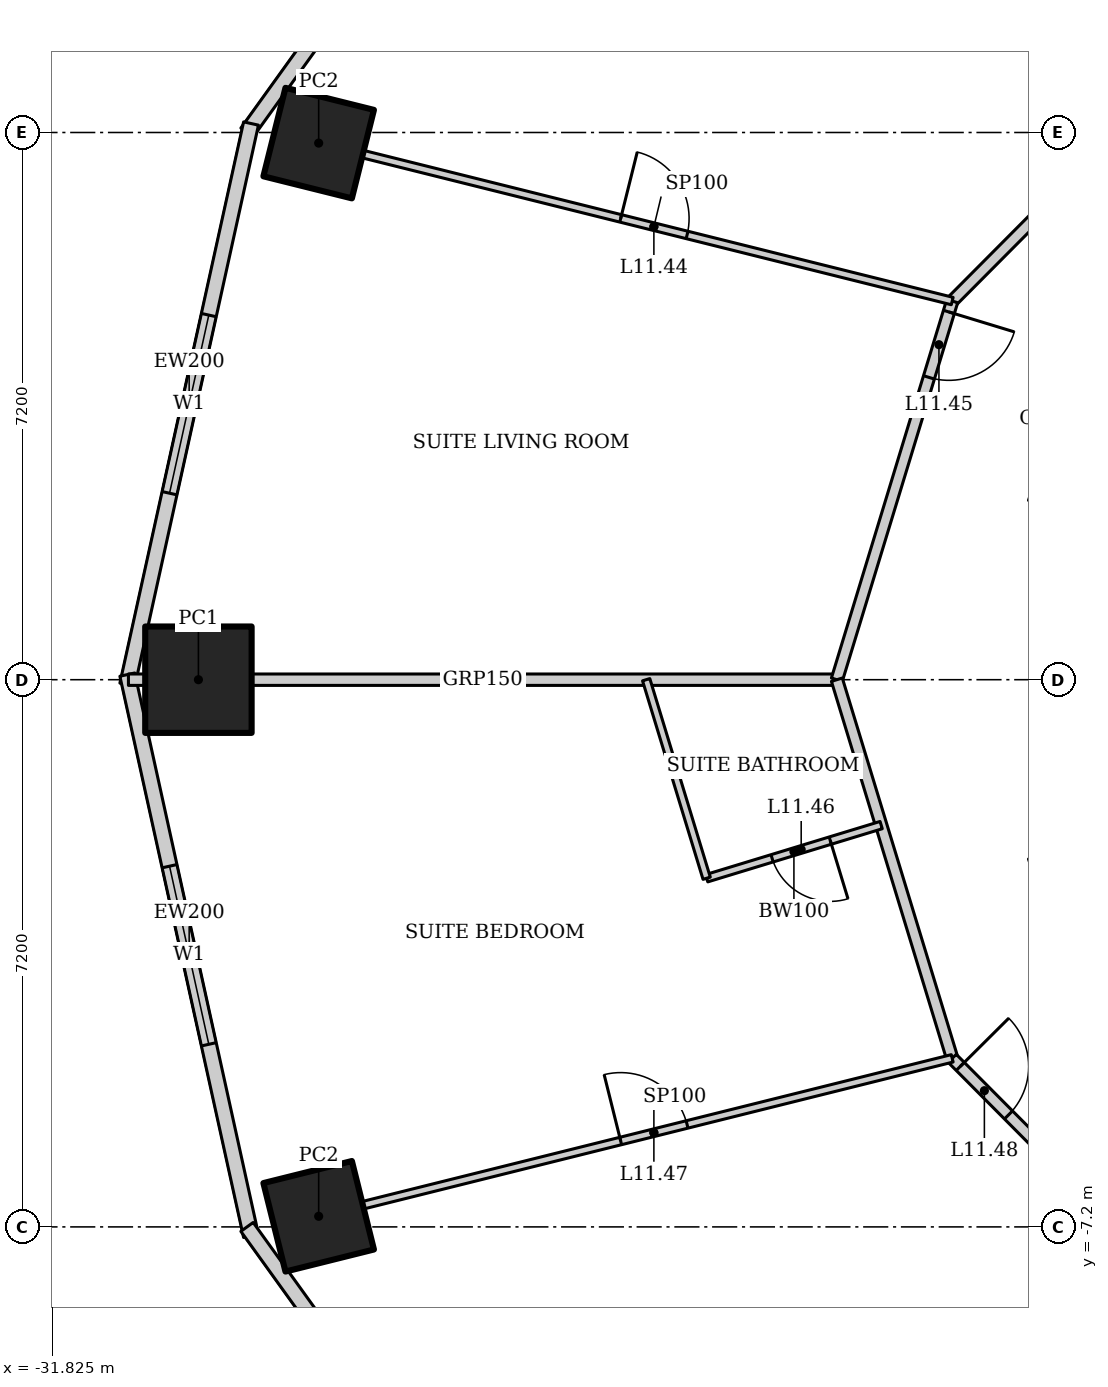
"""IFC4 building model, lengths in metres.
Left out: names, types, materials, properties, quantities, classifications, styles, units other than length and angle.
Written with IfcOpenShell. Run it as: python <this file> out.ifc"""

import sys

from ifc_helpers import new_model, si_unit, direction, frame, frame_2d, origin, origin_2d, place, context, subcontext, project, spatial, rectangle, hollow_rectangle, extrude, element, fill, save


model = new_model("IFC4")
c1 = context("Model", 3, precision=1e-05, world=origin(), true_north=direction((0.0, 1.0)))
c2 = subcontext(c1, "Body", "Model", "MODEL_VIEW")
j1 = project(units=[si_unit("LENGTHUNIT", "METRE"), si_unit("PLANEANGLEUNIT", "RADIAN")], contexts=[c1])
p1 = place(None, origin())
s1 = spatial("IfcSite", under=j1, at=p1, CompositionType="ELEMENT")
p2 = place(p1, origin())
s2 = spatial("IfcBuilding", under=s1, at=p2, CompositionType="ELEMENT")
p3 = place(p2, frame((0.0, 0.0, 55.0)))
s3 = spatial("IfcBuildingStorey", under=s2, at=p3, CompositionType="ELEMENT", Elevation=55.0)
p4 = place(p3, frame((-28.318, 7.06, 0.0), z_axis=(0.0, 0.0, 1.0), x_axis=(0.2419218956, 0.970295726276, 0.0)))
e1 = element("IfcColumn", 1, at=p4, inside=s3, PredefinedType="COLUMN", context=c2, shape_type="SweptSolid", body=[
    extrude(hollow_rectangle(XDim=1.2, YDim=1.2, WallThickness=0.1, at=origin_2d()), origin(), (0.0, 0.0, 1.0), 3.6),
])
p5 = place(p3, frame((-29.9, 0.0, 0.0), z_axis=(0.0, 0.0, 1.0), x_axis=(1.0, 0.0, 0.0)))
e2 = element("IfcColumn", 2, at=p5, inside=s3, PredefinedType="COLUMN", context=c2, shape_type="SweptSolid", body=[
    extrude(hollow_rectangle(XDim=1.4, YDim=1.4, WallThickness=0.1, at=origin_2d()), origin(), (0.0, 0.0, 1.0), 3.6),
])
p6 = place(p3, frame((-28.318, -7.06, 0.0), z_axis=(0.0, 0.0, 1.0), x_axis=(0.970295726276, 0.2419218956, 0.0)))
e3 = element("IfcColumn", 3, at=p6, inside=s3, PredefinedType="COLUMN", context=c2, shape_type="SweptSolid", body=[
    extrude(hollow_rectangle(XDim=1.2, YDim=1.2, WallThickness=0.1, at=origin_2d()), origin(), (0.0, 0.0, 1.0), 3.6),
])
p7 = place(p3, frame((-24.4, 13.957, 0.0), z_axis=(0.0, 0.0, 1.0), x_axis=(-0.583937613703, -0.811798536155, 0.0)))
e4 = element("IfcWall", 4, at=p7, inside=s3, PredefinedType="SOLIDWALL", context=c2, shape_type="SweptSolid", body=[
    extrude(rectangle(XDim=8.323, YDim=0.2, at=frame_2d((4.162, 0.0))), origin(), (0.0, 0.0, 1.0), 3.45),
])
p8 = place(p7, frame((2.961, 0.0, 0.5)))
e5 = element("IfcOpeningElement", 5, at=p8, cuts=e4, PredefinedType="OPENING", context=c2, shape_type="SweptSolid", body=[
    extrude(rectangle(XDim=2.4, YDim=2.2, at=frame_2d((1.2, 1.1))), frame((0.0, 0.11, 0.0), z_axis=(0.0, -1.0, 0.0), x_axis=(1.0, 0.0, 0.0)), (0.0, 0.0, 1.0), 0.22),
])
p9 = place(p3, frame((-29.208, 7.318, 0.0), z_axis=(0.0, 0.0, 1.0), x_axis=(-0.215238065514, -0.976561608478, 0.0)))
e6 = element("IfcWall", 6, at=p9, inside=s3, PredefinedType="SOLIDWALL", context=c2, shape_type="SweptSolid", body=[
    extrude(rectangle(XDim=7.562, YDim=0.2, at=frame_2d((3.781, 0.0))), origin(), (0.0, 0.0, 1.0), 3.45),
])
p10 = place(p9, frame((2.581, 0.0, 0.5)))
e7 = element("IfcOpeningElement", 7, at=p10, cuts=e6, PredefinedType="OPENING", context=c2, shape_type="SweptSolid", body=[
    extrude(rectangle(XDim=2.4, YDim=2.2, at=frame_2d((1.2, 1.1))), frame((0.0, 0.11, 0.0), z_axis=(0.0, -1.0, 0.0), x_axis=(1.0, 0.0, 0.0)), (0.0, 0.0, 1.0), 0.22),
])
p11 = place(p3, frame((-30.835, 0.067, 0.0), z_axis=(0.0, 0.0, 1.0), x_axis=(0.215238065514, -0.976561608478, 0.0)))
e8 = element("IfcWall", 8, at=p11, inside=s3, PredefinedType="SOLIDWALL", context=c2, shape_type="SweptSolid", body=[
    extrude(rectangle(XDim=7.562, YDim=0.2, at=frame_2d((3.781, 0.0))), origin(), (0.0, 0.0, 1.0), 3.45),
])
p12 = place(p11, frame((2.581, 0.0, 0.5)))
e9 = element("IfcOpeningElement", 9, at=p12, cuts=e8, PredefinedType="OPENING", context=c2, shape_type="SweptSolid", body=[
    extrude(rectangle(XDim=2.4, YDim=2.2, at=frame_2d((1.2, 1.1))), frame((0.0, 0.11, 0.0), z_axis=(0.0, -1.0, 0.0), x_axis=(1.0, 0.0, 0.0)), (0.0, 0.0, 1.0), 0.22),
])
p13 = place(p3, frame((-29.26, -7.2, 0.0), z_axis=(0.0, 0.0, 1.0), x_axis=(0.583937613703, -0.811798536155, 0.0)))
e10 = element("IfcWall", 10, at=p13, inside=s3, PredefinedType="SOLIDWALL", context=c2, shape_type="SweptSolid", body=[
    extrude(rectangle(XDim=8.323, YDim=0.2, at=frame_2d((4.162, 0.0))), origin(), (0.0, 0.0, 1.0), 3.45),
])
p14 = place(p13, frame((2.961, 0.0, 0.5)))
e11 = element("IfcOpeningElement", 11, at=p14, cuts=e10, PredefinedType="OPENING", context=c2, shape_type="SweptSolid", body=[
    extrude(rectangle(XDim=2.4, YDim=2.2, at=frame_2d((1.2, 1.1))), frame((0.0, 0.11, 0.0), z_axis=(0.0, -1.0, 0.0), x_axis=(1.0, 0.0, 0.0)), (0.0, 0.0, 1.0), 0.22),
])
p15 = place(p3, frame((-30.821, 0.0, 0.0), z_axis=(0.0, 0.0, 1.0), x_axis=(1.0, 0.0, 0.0)))
e12 = element("IfcWall", 12, at=p15, inside=s3, PredefinedType="PARTITIONING", context=c2, shape_type="SweptSolid", body=[
    extrude(rectangle(XDim=9.321, YDim=0.15, at=frame_2d((4.66, 0.0))), origin(), (0.0, 0.0, 1.0), 2.528),
])
p16 = place(p3, frame((-15.901, 9.086, 0.0), z_axis=(0.0, 0.0, 1.0), x_axis=(-0.705121546414, -0.709086457904, 0.0)))
e13 = element("IfcWall", 13, at=p16, inside=s3, PredefinedType="PARTITIONING", context=c2, shape_type="SweptSolid", body=[
    extrude(rectangle(XDim=5.788, YDim=0.15, at=frame_2d((2.894, 0.0))), origin(), (0.0, 0.0, 1.0), 3.45),
])
p17 = place(p3, frame((-19.982, 4.982, 0.0), z_axis=(0.0, 0.0, 1.0), x_axis=(-0.291383581394, -0.95660629754, 0.0)))
e14 = element("IfcWall", 14, at=p17, inside=s3, PredefinedType="PARTITIONING", context=c2, shape_type="SweptSolid", body=[
    extrude(rectangle(XDim=5.208, YDim=0.15, at=frame_2d((2.604, 0.0))), origin(), (0.0, 0.0, 1.0), 3.45),
])
p18 = place(p17, frame((0.15, 0.0, 0.0)))
e15 = element("IfcOpeningElement", 15, at=p18, cuts=e14, PredefinedType="OPENING", context=c2, shape_type="SweptSolid", body=[
    extrude(rectangle(XDim=0.9, YDim=2.1, at=frame_2d((0.45, 1.05))), frame((0.0, 0.085, 0.0), z_axis=(0.0, -1.0, 0.0), x_axis=(1.0, 0.0, 0.0)), (0.0, 0.0, 1.0), 0.17),
])
p19 = place(p3, frame((-21.5, 0.0, 0.0), z_axis=(0.0, 0.0, 1.0), x_axis=(0.291383581394, -0.95660629754, 0.0)))
e16 = element("IfcWall", 16, at=p19, inside=s3, PredefinedType="PARTITIONING", context=c2, shape_type="SweptSolid", body=[
    extrude(rectangle(XDim=5.208, YDim=0.15, at=frame_2d((2.604, 0.0))), origin(), (0.0, 0.0, 1.0), 3.45),
])
p20 = place(p3, frame((-19.982, -4.982, 0.0), z_axis=(0.0, 0.0, 1.0), x_axis=(0.705121546414, -0.709086457904, 0.0)))
e17 = element("IfcWall", 17, at=p20, inside=s3, PredefinedType="PARTITIONING", context=c2, shape_type="SweptSolid", body=[
    extrude(rectangle(XDim=5.788, YDim=0.15, at=frame_2d((2.894, 0.0))), origin(), (0.0, 0.0, 1.0), 3.45),
])
p21 = place(p20, frame((0.15, 0.0, 0.0)))
e18 = element("IfcOpeningElement", 18, at=p21, cuts=e17, PredefinedType="OPENING", context=c2, shape_type="SweptSolid", body=[
    extrude(rectangle(XDim=0.9, YDim=2.1, at=frame_2d((0.45, 1.05))), frame((0.0, 0.085, 0.0), z_axis=(0.0, -1.0, 0.0), x_axis=(1.0, 0.0, 0.0)), (0.0, 0.0, 1.0), 0.17),
])
p22 = place(p3, frame((-17.311, 7.668, 0.0), z_axis=(0.0, 0.0, 1.0), x_axis=(-0.709138392716, 0.705069315724, 0.0)))
e19 = element("IfcWall", 19, at=p22, inside=s3, PredefinedType="PARTITIONING", context=c2, shape_type="SweptSolid", body=[
    extrude(rectangle(XDim=2.4, YDim=0.1, at=frame_2d((1.2, 0.0))), origin(), (0.0, 0.0, 1.0), 3.45),
])
p23 = place(p22, frame((0.7, 0.0, 0.0)))
e20 = element("IfcOpeningElement", 20, at=p23, cuts=e19, PredefinedType="OPENING", context=c2, shape_type="SweptSolid", body=[
    extrude(rectangle(XDim=0.8, YDim=2.1, at=frame_2d((0.4, 1.05))), frame((0.0, 0.06, 0.0), z_axis=(0.0, -1.0, 0.0), x_axis=(1.0, 0.0, 0.0)), (0.0, 0.0, 1.0), 0.12),
])
p24 = place(p3, frame((-27.833, 6.939, 0.0), z_axis=(0.0, 0.0, 1.0), x_axis=(0.97029673161, -0.24191786339, 0.0)))
e21 = element("IfcWall", 21, at=p24, inside=s3, PredefinedType="PARTITIONING", context=c2, shape_type="SweptSolid", body=[
    extrude(rectangle(XDim=8.091, YDim=0.1, at=frame_2d((4.045, 0.0))), origin(), (0.0, 0.0, 1.0), 2.333),
])
p25 = place(p24, frame((3.595, 0.0, 0.0)))
e22 = element("IfcOpeningElement", 22, at=p25, cuts=e21, PredefinedType="OPENING", context=c2, shape_type="SweptSolid", body=[
    extrude(rectangle(XDim=0.9, YDim=2.1, at=frame_2d((0.45, 1.05))), frame((0.0, 0.06, 0.0), z_axis=(0.0, -1.0, 0.0), x_axis=(1.0, 0.0, 0.0)), (0.0, 0.0, 1.0), 0.12),
])
p26 = place(p3, frame((-20.917, -1.913, 0.0), z_axis=(0.0, 0.0, 1.0), x_axis=(-0.956591303063, -0.291432803411, 0.0)))
e23 = element("IfcWall", 23, at=p26, inside=s3, PredefinedType="PARTITIONING", context=c2, shape_type="SweptSolid", body=[
    extrude(rectangle(XDim=2.4, YDim=0.1, at=frame_2d((1.2, 0.0))), origin(), (0.0, 0.0, 1.0), 3.45),
])
p27 = place(p26, frame((0.7, 0.0, 0.0)))
e24 = element("IfcOpeningElement", 24, at=p27, cuts=e23, PredefinedType="OPENING", context=c2, shape_type="SweptSolid", body=[
    extrude(rectangle(XDim=0.8, YDim=2.1, at=frame_2d((0.4, 1.05))), frame((0.0, 0.06, 0.0), z_axis=(0.0, -1.0, 0.0), x_axis=(1.0, 0.0, 0.0)), (0.0, 0.0, 1.0), 0.12),
])
p28 = place(p3, frame((-23.213, -2.613, 0.0), z_axis=(0.0, 0.0, 1.0), x_axis=(-0.291339473488, 0.956619731757, 0.0)))
e25 = element("IfcWall", 25, at=p28, inside=s3, PredefinedType="PARTITIONING", context=c2, shape_type="SweptSolid", body=[
    extrude(rectangle(XDim=2.731, YDim=0.1, at=frame_2d((1.365, 0.0))), origin(), (0.0, 0.0, 1.0), 3.45),
])
p29 = place(p3, frame((-27.833, -6.939, 0.0), z_axis=(0.0, 0.0, 1.0), x_axis=(0.97029673161, 0.24191786339, 0.0)))
e26 = element("IfcWall", 26, at=p29, inside=s3, PredefinedType="PARTITIONING", context=c2, shape_type="SweptSolid", body=[
    extrude(rectangle(XDim=8.091, YDim=0.1, at=frame_2d((4.045, 0.0))), origin(), (0.0, 0.0, 1.0), 2.333),
])
p30 = place(p29, frame((3.595, 0.0, 0.0)))
e27 = element("IfcOpeningElement", 27, at=p30, cuts=e26, PredefinedType="OPENING", context=c2, shape_type="SweptSolid", body=[
    extrude(rectangle(XDim=0.9, YDim=2.1, at=frame_2d((0.45, 1.05))), frame((0.0, 0.06, 0.0), z_axis=(0.0, -1.0, 0.0), x_axis=(1.0, 0.0, 0.0)), (0.0, 0.0, 1.0), 0.12),
])
p31 = place(p10, origin())
e28 = element("IfcWindow", 28, at=p31, inside=s3, PartitioningType="SINGLE_PANEL", PredefinedType="WINDOW", context=c2, shape_type="SweptSolid", body=[
    extrude(rectangle(XDim=2.4, YDim=2.2, at=frame_2d((1.2, 1.1))), frame((0.0, 0.03, 0.0), z_axis=(0.0, -1.0, 0.0), x_axis=(1.0, 0.0, 0.0)), (0.0, 0.0, 1.0), 0.06),
])
fill(e7, e28)
p32 = place(p12, origin())
e29 = element("IfcWindow", 29, at=p32, inside=s3, PartitioningType="SINGLE_PANEL", PredefinedType="WINDOW", context=c2, shape_type="SweptSolid", body=[
    extrude(rectangle(XDim=2.4, YDim=2.2, at=frame_2d((1.2, 1.1))), frame((0.0, 0.03, 0.0), z_axis=(0.0, -1.0, 0.0), x_axis=(1.0, 0.0, 0.0)), (0.0, 0.0, 1.0), 0.06),
])
fill(e9, e29)
p33 = place(p25, origin())
e30 = element("IfcDoor", 30, at=p33, inside=s3, OperationType="SINGLE_SWING_LEFT", PredefinedType="DOOR", context=c2, shape_type="SweptSolid", body=[
    extrude(rectangle(XDim=0.9, YDim=2.1, at=frame_2d((0.45, 1.05))), frame((0.0, 0.025, 0.0), z_axis=(0.0, -1.0, 0.0), x_axis=(1.0, 0.0, 0.0)), (0.0, 0.0, 1.0), 0.05),
])
fill(e22, e30)
p34 = place(p18, origin())
e31 = element("IfcDoor", 31, at=p34, inside=s3, OperationType="SINGLE_SWING_LEFT", PredefinedType="DOOR", context=c2, shape_type="SweptSolid", body=[
    extrude(rectangle(XDim=0.9, YDim=2.1, at=frame_2d((0.45, 1.05))), frame((0.0, 0.025, 0.0), z_axis=(0.0, -1.0, 0.0), x_axis=(1.0, 0.0, 0.0)), (0.0, 0.0, 1.0), 0.05),
])
fill(e15, e31)
p35 = place(p27, origin())
e32 = element("IfcDoor", 32, at=p35, inside=s3, OperationType="SINGLE_SWING_LEFT", PredefinedType="DOOR", context=c2, shape_type="SweptSolid", body=[
    extrude(rectangle(XDim=0.8, YDim=2.1, at=frame_2d((0.4, 1.05))), frame((0.0, 0.025, 0.0), z_axis=(0.0, -1.0, 0.0), x_axis=(1.0, 0.0, 0.0)), (0.0, 0.0, 1.0), 0.05),
])
fill(e24, e32)
p36 = place(p30, origin())
e33 = element("IfcDoor", 33, at=p36, inside=s3, OperationType="SINGLE_SWING_LEFT", PredefinedType="DOOR", context=c2, shape_type="SweptSolid", body=[
    extrude(rectangle(XDim=0.9, YDim=2.1, at=frame_2d((0.45, 1.05))), frame((0.0, 0.025, 0.0), z_axis=(0.0, -1.0, 0.0), x_axis=(1.0, 0.0, 0.0)), (0.0, 0.0, 1.0), 0.05),
])
fill(e27, e33)
p37 = place(p21, origin())
e34 = element("IfcDoor", 34, at=p37, inside=s3, OperationType="SINGLE_SWING_LEFT", PredefinedType="DOOR", context=c2, shape_type="SweptSolid", body=[
    extrude(rectangle(XDim=0.9, YDim=2.1, at=frame_2d((0.45, 1.05))), frame((0.0, 0.025, 0.0), z_axis=(0.0, -1.0, 0.0), x_axis=(1.0, 0.0, 0.0)), (0.0, 0.0, 1.0), 0.05),
])
fill(e18, e34)
save(model, sys.argv[1])
